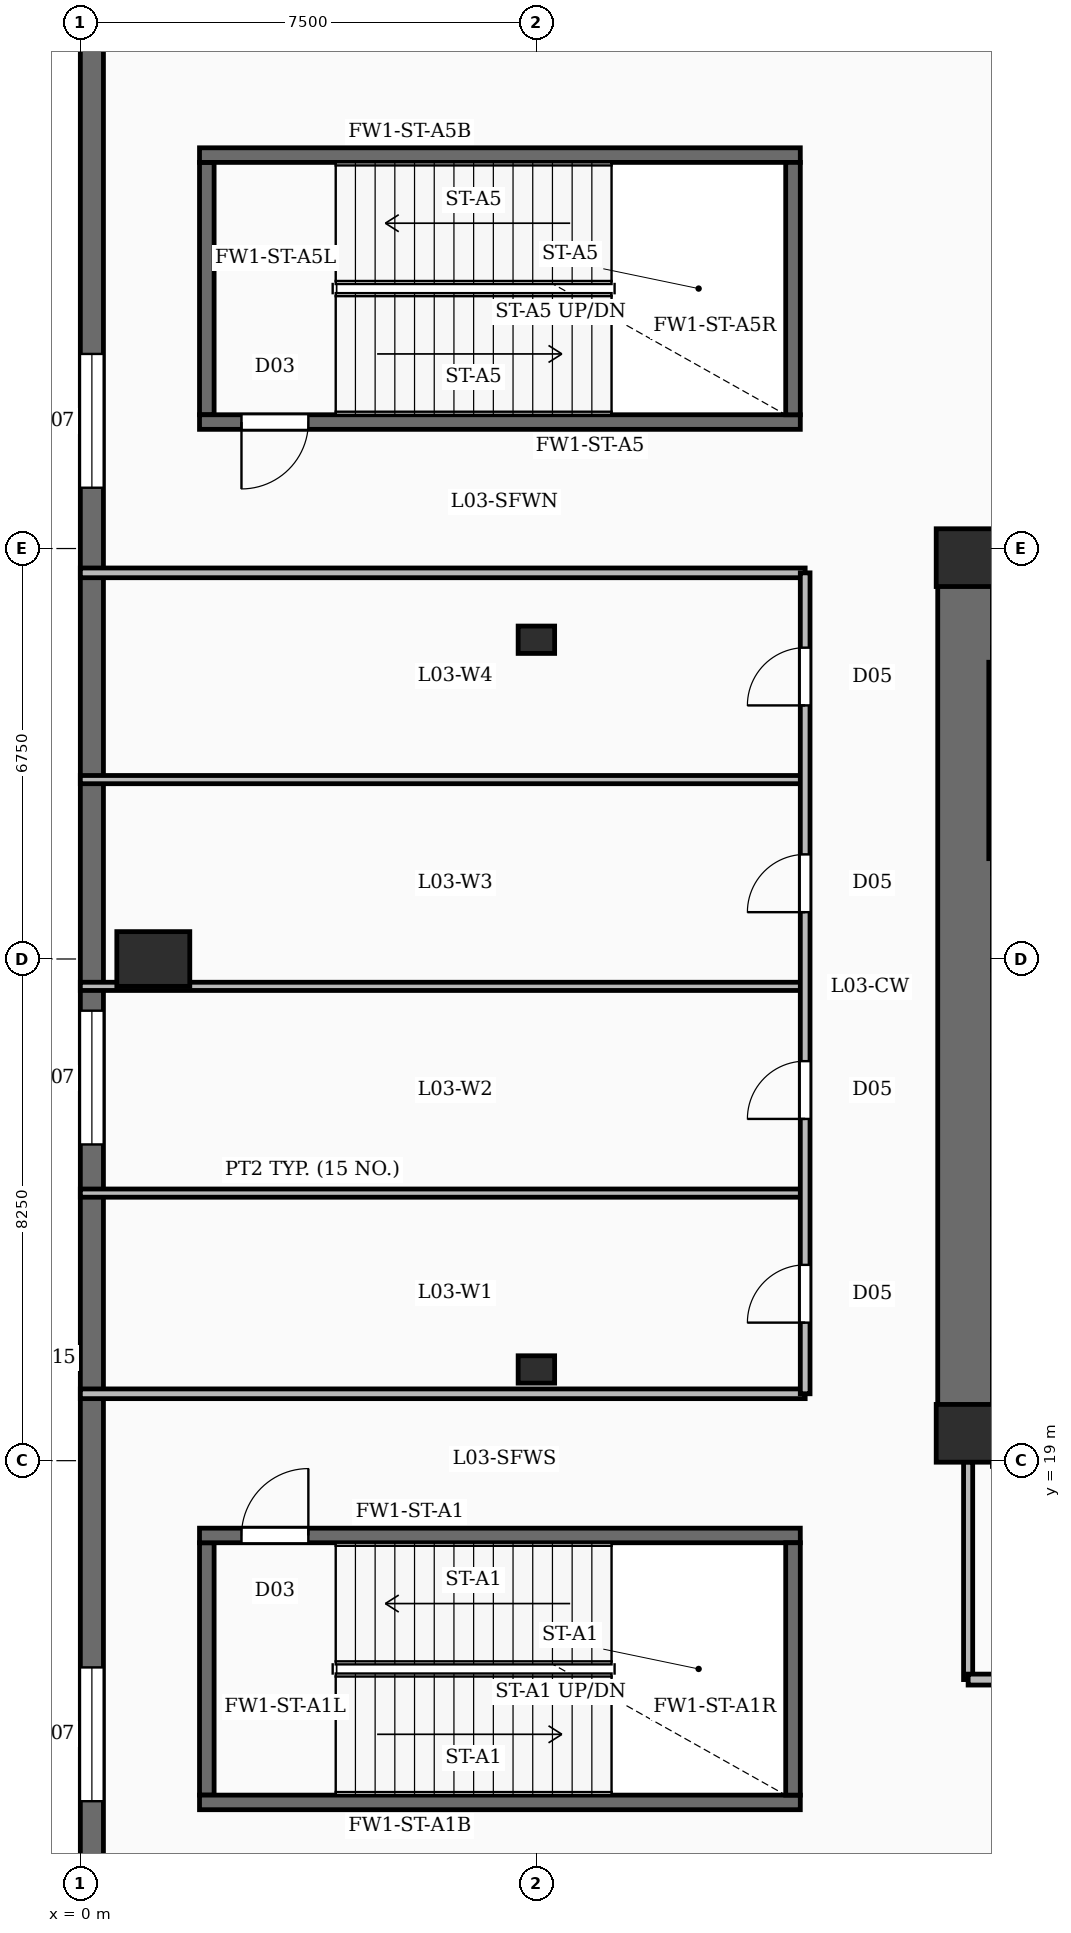
"""IFC4 building model, lengths in metres.
Left out: names, types, materials, properties, quantities, classifications, styles, units other than length and angle.
Written with IfcOpenShell. Run it as: python <this file> out.ifc"""

import sys

from ifc_helpers import new_model, si_unit, direction, frame, frame_2d, origin, origin_2d, place, context, subcontext, project, spatial, rectangle, extrude, element, fill, save


model = new_model("IFC4")
c1 = context("Model", 3, precision=1e-05, world=origin(), true_north=direction((0.0, 1.0)))
c2 = subcontext(c1, "Body", "Model", "MODEL_VIEW")
j1 = project(units=[si_unit("LENGTHUNIT", "METRE"), si_unit("PLANEANGLEUNIT", "RADIAN")], contexts=[c1])
p1 = place(None, origin())
s1 = spatial("IfcSite", under=j1, at=p1, CompositionType="ELEMENT")
p2 = place(p1, origin())
s2 = spatial("IfcBuilding", under=s1, at=p2, CompositionType="ELEMENT")
p3 = place(p2, frame((0.0, 0.0, 18.0)))
s3 = spatial("IfcBuildingStorey", under=s2, at=p3, CompositionType="ELEMENT", Elevation=18.0)
p4 = place(p3, frame((14.55, 19.0, -0.35), z_axis=(0.0, 0.0, 1.0), x_axis=(0.0, 1.0, 0.0)))
e1 = element("IfcWall", 1, at=p4, inside=s3, PredefinedType="SHEAR", context=c2, shape_type="SweptSolid", body=[
    extrude(rectangle(XDim=15.3, YDim=0.9, at=frame_2d((7.65, 0.0))), origin(), (0.0, 0.0, 1.0), 5.0),
])
for number, where, z_axis, x_axis in (
    (2, (14.55, 19.45, -0.35), (0.0, 0.0, 1.0), (1.0, 0.0, 0.0)),
    (3, (14.55, 33.85, -0.35), (0.0, 0.0, 1.0), (1.0, 0.0, 0.0)),
):
    element("IfcColumn", number, at=place(p3, frame(where, z_axis=z_axis, x_axis=x_axis)), inside=s3, PredefinedType="COLUMN", context=c2, shape_type="SweptSolid", body=[
        extrude(rectangle(XDim=0.95, YDim=0.95, at=origin_2d()), origin(), (0.0, 0.0, 1.0), 5.0),
    ])
p5 = place(p3, frame((1.2, 27.25, -0.35), z_axis=(0.0, 0.0, 1.0), x_axis=(1.0, 0.0, 0.0)))
e4 = element("IfcColumn", 4, at=p5, inside=s3, PredefinedType="COLUMN", context=c2, shape_type="SweptSolid", body=[
    extrude(rectangle(XDim=1.2, YDim=0.9, at=origin_2d()), origin(), (0.0, 0.0, 1.0), 5.0),
])
for number, where, z_axis, x_axis in (
    (5, (7.5, 20.5, -0.35), (0.0, 0.0, 1.0), (1.0, 0.0, 0.0)),
    (6, (7.5, 32.5, -0.35), (0.0, 0.0, 1.0), (1.0, 0.0, 0.0)),
):
    element("IfcColumn", number, at=place(p3, frame(where, z_axis=z_axis, x_axis=x_axis)), inside=s3, PredefinedType="PILASTER", context=c2, shape_type="SweptSolid", body=[
        extrude(rectangle(XDim=0.6, YDim=0.45, at=origin_2d()), origin(), (0.0, 0.0, 1.0), 5.0),
    ])
p6 = place(p3, frame((0.19, 5.4, 0.0), z_axis=(0.0, 0.0, 1.0), x_axis=(0.0, 1.0, 0.0)))
e7 = element("IfcWall", 7, at=p6, inside=s3, PredefinedType="SOLIDWALL", context=c2, shape_type="SweptSolid", body=[
    extrude(rectangle(XDim=43.7, YDim=0.38, at=frame_2d((21.85, 0.0))), origin(), (0.0, 0.0, 1.0), 4.65),
])
p7 = place(p6, frame((2.6, 0.0, 0.95)))
e8 = element("IfcOpeningElement", 8, at=p7, cuts=e7, PredefinedType="OPENING", context=c2, shape_type="SweptSolid", body=[
    extrude(rectangle(XDim=2.2, YDim=2.5, at=frame_2d((1.1, 1.25))), frame((0.0, 0.2, 0.0), z_axis=(0.0, -1.0, 0.0), x_axis=(1.0, 0.0, 0.0)), (0.0, 0.0, 1.0), 0.4),
])
p8 = place(p6, frame((8.0, 0.0, 0.95)))
e9 = element("IfcOpeningElement", 9, at=p8, cuts=e7, PredefinedType="OPENING", context=c2, shape_type="SweptSolid", body=[
    extrude(rectangle(XDim=2.2, YDim=2.5, at=frame_2d((1.1, 1.25))), frame((0.0, 0.2, 0.0), z_axis=(0.0, -1.0, 0.0), x_axis=(1.0, 0.0, 0.0)), (0.0, 0.0, 1.0), 0.4),
])
p9 = place(p6, frame((18.8, 0.0, 0.95)))
e10 = element("IfcOpeningElement", 10, at=p9, cuts=e7, PredefinedType="OPENING", context=c2, shape_type="SweptSolid", body=[
    extrude(rectangle(XDim=2.2, YDim=2.5, at=frame_2d((1.1, 1.25))), frame((0.0, 0.2, 0.0), z_axis=(0.0, -1.0, 0.0), x_axis=(1.0, 0.0, 0.0)), (0.0, 0.0, 1.0), 0.4),
])
p10 = place(p6, frame((29.6, 0.0, 0.95)))
e11 = element("IfcOpeningElement", 11, at=p10, cuts=e7, PredefinedType="OPENING", context=c2, shape_type="SweptSolid", body=[
    extrude(rectangle(XDim=2.2, YDim=2.5, at=frame_2d((1.1, 1.25))), frame((0.0, 0.2, 0.0), z_axis=(0.0, -1.0, 0.0), x_axis=(1.0, 0.0, 0.0)), (0.0, 0.0, 1.0), 0.4),
])
p11 = place(p3, frame((1.96, 17.77, 0.0), z_axis=(0.0, 0.0, 1.0), x_axis=(1.0, 0.0, 0.0)))
e12 = element("IfcWall", 12, at=p11, inside=s3, PredefinedType="SOLIDWALL", context=c2, shape_type="SweptSolid", body=[
    extrude(rectangle(XDim=9.88, YDim=0.24, at=frame_2d((4.94, 0.0))), origin(), (0.0, 0.0, 1.0), 4.65),
])
p12 = place(p11, frame((0.69, 0.0, 0.0)))
e13 = element("IfcOpeningElement", 13, at=p12, cuts=e12, PredefinedType="OPENING", context=c2, shape_type="SweptSolid", body=[
    extrude(rectangle(XDim=1.1, YDim=2.15, at=frame_2d((0.55, 1.075))), frame((0.0, 0.13, 0.0), z_axis=(0.0, -1.0, 0.0), x_axis=(1.0, 0.0, 0.0)), (0.0, 0.0, 1.0), 0.26),
])
p13 = place(p3, frame((1.96, 13.38, 0.0), z_axis=(0.0, 0.0, 1.0), x_axis=(1.0, 0.0, 0.0)))
e14 = element("IfcWall", 14, at=p13, inside=s3, PredefinedType="SOLIDWALL", context=c2, shape_type="SweptSolid", body=[
    extrude(rectangle(XDim=9.88, YDim=0.24, at=frame_2d((4.94, 0.0))), origin(), (0.0, 0.0, 1.0), 4.65),
])
for number, where, z_axis, x_axis in (
    (15, (2.08, 13.5, 0.0), (0.0, 0.0, 1.0), (0.0, 1.0, 0.0)),
    (16, (11.72, 13.5, 0.0), (0.0, 0.0, 1.0), (0.0, 1.0, 0.0)),
):
    element("IfcWall", number, at=place(p3, frame(where, z_axis=z_axis, x_axis=x_axis)), inside=s3, PredefinedType="SOLIDWALL", context=c2, shape_type="SweptSolid", body=[
        extrude(rectangle(XDim=4.15, YDim=0.24, at=frame_2d((2.075, 0.0))), origin(), (0.0, 0.0, 1.0), 4.65),
    ])
p14 = place(p3, frame((11.84, 36.08, 0.0), z_axis=(0.0, 0.0, 1.0), x_axis=(-1.0, 0.0, 0.0)))
e17 = element("IfcWall", 17, at=p14, inside=s3, PredefinedType="SOLIDWALL", context=c2, shape_type="SweptSolid", body=[
    extrude(rectangle(XDim=9.88, YDim=0.24, at=frame_2d((4.94, 0.0))), origin(), (0.0, 0.0, 1.0), 4.65),
])
p15 = place(p14, frame((8.09, 0.0, 0.0)))
e18 = element("IfcOpeningElement", 18, at=p15, cuts=e17, PredefinedType="OPENING", context=c2, shape_type="SweptSolid", body=[
    extrude(rectangle(XDim=1.1, YDim=2.15, at=frame_2d((0.55, 1.075))), frame((0.0, 0.13, 0.0), z_axis=(0.0, -1.0, 0.0), x_axis=(1.0, 0.0, 0.0)), (0.0, 0.0, 1.0), 0.26),
])
p16 = place(p3, frame((1.96, 40.47, 0.0), z_axis=(0.0, 0.0, 1.0), x_axis=(1.0, 0.0, 0.0)))
e19 = element("IfcWall", 19, at=p16, inside=s3, PredefinedType="SOLIDWALL", context=c2, shape_type="SweptSolid", body=[
    extrude(rectangle(XDim=9.88, YDim=0.24, at=frame_2d((4.94, 0.0))), origin(), (0.0, 0.0, 1.0), 4.65),
])
for number, where, z_axis, x_axis in (
    (20, (2.08, 36.2, 0.0), (0.0, 0.0, 1.0), (0.0, 1.0, 0.0)),
    (21, (11.72, 36.2, 0.0), (0.0, 0.0, 1.0), (0.0, 1.0, 0.0)),
):
    element("IfcWall", number, at=place(p3, frame(where, z_axis=z_axis, x_axis=x_axis)), inside=s3, PredefinedType="SOLIDWALL", context=c2, shape_type="SweptSolid", body=[
        extrude(rectangle(XDim=4.15, YDim=0.24, at=frame_2d((2.075, 0.0))), origin(), (0.0, 0.0, 1.0), 4.65),
    ])
p17 = place(p3, frame((15.06, 28.9, 0.0), z_axis=(0.0, 0.0, 1.0), x_axis=(0.0, 1.0, 0.0)))
e22 = element("IfcWall", 22, at=p17, inside=s3, PredefinedType="SOLIDWALL", context=c2, shape_type="SweptSolid", body=[
    extrude(rectangle(XDim=3.23, YDim=0.24, at=frame_2d((1.615, 0.0))), origin(), (0.0, 0.0, 1.0), 4.65),
])
p18 = place(p3, frame((14.6, 15.4, 0.0), z_axis=(0.0, 0.0, 1.0), x_axis=(1.0, 0.0, 0.0)))
e23 = element("IfcWall", 23, at=p18, inside=s3, PredefinedType="PARTITIONING", context=c2, shape_type="SweptSolid", body=[
    extrude(rectangle(XDim=9.9, YDim=0.18, at=frame_2d((4.95, 0.0))), origin(), (0.0, 0.0, 1.0), 3.71),
])
p19 = place(p18, frame((0.79, 0.0, 0.0)))
e24 = element("IfcOpeningElement", 24, at=p19, cuts=e23, PredefinedType="OPENING", context=c2, shape_type="SweptSolid", body=[
    extrude(rectangle(XDim=0.92, YDim=2.1, at=frame_2d((0.46, 1.05))), frame((0.0, 0.1, 0.0), z_axis=(0.0, -1.0, 0.0), x_axis=(1.0, 0.0, 0.0)), (0.0, 0.0, 1.0), 0.2),
])
p20 = place(p18, frame((3.29, 0.0, 0.0)))
e25 = element("IfcOpeningElement", 25, at=p20, cuts=e23, PredefinedType="OPENING", context=c2, shape_type="SweptSolid", body=[
    extrude(rectangle(XDim=0.92, YDim=2.1, at=frame_2d((0.46, 1.05))), frame((0.0, 0.1, 0.0), z_axis=(0.0, -1.0, 0.0), x_axis=(1.0, 0.0, 0.0)), (0.0, 0.0, 1.0), 0.2),
])
p21 = place(p18, frame((5.79, 0.0, 0.0)))
e26 = element("IfcOpeningElement", 26, at=p21, cuts=e23, PredefinedType="OPENING", context=c2, shape_type="SweptSolid", body=[
    extrude(rectangle(XDim=0.92, YDim=2.1, at=frame_2d((0.46, 1.05))), frame((0.0, 0.1, 0.0), z_axis=(0.0, -1.0, 0.0), x_axis=(1.0, 0.0, 0.0)), (0.0, 0.0, 1.0), 0.2),
])
p22 = place(p18, frame((8.24, 0.0, 0.0)))
e27 = element("IfcOpeningElement", 27, at=p22, cuts=e23, PredefinedType="OPENING", context=c2, shape_type="SweptSolid", body=[
    extrude(rectangle(XDim=0.92, YDim=2.1, at=frame_2d((0.46, 1.05))), frame((0.0, 0.1, 0.0), z_axis=(0.0, -1.0, 0.0), x_axis=(1.0, 0.0, 0.0)), (0.0, 0.0, 1.0), 0.2),
])
p23 = place(p3, frame((14.6, 15.4, 0.0), z_axis=(0.0, 0.0, 1.0), x_axis=(0.0, 1.0, 0.0)))
e28 = element("IfcWall", 28, at=p23, inside=s3, PredefinedType="PARTITIONING", context=c2, shape_type="SweptSolid", body=[
    extrude(rectangle(XDim=3.58, YDim=0.15, at=frame_2d((1.79, 0.0))), origin(), (0.0, 0.0, 1.0), 3.71),
])
for number, where, z_axis, x_axis in (
    (29, (0.0, 23.4, 0.0), (0.0, 0.0, 1.0), (1.0, 0.0, 0.0)),
    (30, (0.0, 26.8, 0.0), (0.0, 0.0, 1.0), (1.0, 0.0, 0.0)),
    (31, (0.0, 30.2, 0.0), (0.0, 0.0, 1.0), (1.0, 0.0, 0.0)),
):
    element("IfcWall", number, at=place(p3, frame(where, z_axis=z_axis, x_axis=x_axis)), inside=s3, PredefinedType="PARTITIONING", context=c2, shape_type="SweptSolid", body=[
        extrude(rectangle(XDim=11.92, YDim=0.135, at=frame_2d((5.96, 0.0))), origin(), (0.0, 0.0, 1.0), 3.71),
    ])
p24 = place(p3, frame((11.92, 20.1, 0.0), z_axis=(0.0, 0.0, 1.0), x_axis=(0.0, 1.0, 0.0)))
e32 = element("IfcWall", 32, at=p24, inside=s3, PredefinedType="PARTITIONING", context=c2, shape_type="SweptSolid", body=[
    extrude(rectangle(XDim=13.5, YDim=0.16, at=frame_2d((6.75, 0.0))), origin(), (0.0, 0.0, 1.0), 3.71),
])
p25 = place(p24, frame((1.17, 0.0, 0.0)))
e33 = element("IfcOpeningElement", 33, at=p25, cuts=e32, PredefinedType="OPENING", context=c2, shape_type="SweptSolid", body=[
    extrude(rectangle(XDim=0.95, YDim=2.15, at=frame_2d((0.475, 1.075))), frame((0.0, 0.09, 0.0), z_axis=(0.0, -1.0, 0.0), x_axis=(1.0, 0.0, 0.0)), (0.0, 0.0, 1.0), 0.18),
])
p26 = place(p24, frame((4.52, 0.0, 0.0)))
e34 = element("IfcOpeningElement", 34, at=p26, cuts=e32, PredefinedType="OPENING", context=c2, shape_type="SweptSolid", body=[
    extrude(rectangle(XDim=0.95, YDim=2.15, at=frame_2d((0.475, 1.075))), frame((0.0, 0.09, 0.0), z_axis=(0.0, -1.0, 0.0), x_axis=(1.0, 0.0, 0.0)), (0.0, 0.0, 1.0), 0.18),
])
p27 = place(p24, frame((7.92, 0.0, 0.0)))
e35 = element("IfcOpeningElement", 35, at=p27, cuts=e32, PredefinedType="OPENING", context=c2, shape_type="SweptSolid", body=[
    extrude(rectangle(XDim=0.95, YDim=2.15, at=frame_2d((0.475, 1.075))), frame((0.0, 0.09, 0.0), z_axis=(0.0, -1.0, 0.0), x_axis=(1.0, 0.0, 0.0)), (0.0, 0.0, 1.0), 0.18),
])
p28 = place(p24, frame((11.32, 0.0, 0.0)))
e36 = element("IfcOpeningElement", 36, at=p28, cuts=e32, PredefinedType="OPENING", context=c2, shape_type="SweptSolid", body=[
    extrude(rectangle(XDim=0.95, YDim=2.15, at=frame_2d((0.475, 1.075))), frame((0.0, 0.09, 0.0), z_axis=(0.0, -1.0, 0.0), x_axis=(1.0, 0.0, 0.0)), (0.0, 0.0, 1.0), 0.18),
])
for number, where, z_axis, x_axis in (
    (37, (0.0, 20.1, 0.0), (0.0, 0.0, 1.0), (1.0, 0.0, 0.0)),
    (38, (0.0, 33.6, 0.0), (0.0, 0.0, 1.0), (1.0, 0.0, 0.0)),
):
    element("IfcWall", number, at=place(p3, frame(where, z_axis=z_axis, x_axis=x_axis)), inside=s3, PredefinedType="PARTITIONING", context=c2, shape_type="SweptSolid", body=[
        extrude(rectangle(XDim=11.92, YDim=0.16, at=frame_2d((5.96, 0.0))), origin(), (0.0, 0.0, 1.0), 3.71),
    ])
p29 = place(p8, origin())
e39 = element("IfcWindow", 39, at=p29, inside=s3, PartitioningType="DOUBLE_PANEL_VERTICAL", PredefinedType="WINDOW", context=c2, shape_type="SweptSolid", body=[
    extrude(rectangle(XDim=2.2, YDim=2.5, at=frame_2d((1.1, 1.25))), frame((0.0, 0.03, 0.0), z_axis=(0.0, -1.0, 0.0), x_axis=(1.0, 0.0, 0.0)), (0.0, 0.0, 1.0), 0.06),
])
fill(e9, e39)
p30 = place(p9, origin())
e40 = element("IfcWindow", 40, at=p30, inside=s3, PartitioningType="DOUBLE_PANEL_VERTICAL", PredefinedType="WINDOW", context=c2, shape_type="SweptSolid", body=[
    extrude(rectangle(XDim=2.2, YDim=2.5, at=frame_2d((1.1, 1.25))), frame((0.0, 0.03, 0.0), z_axis=(0.0, -1.0, 0.0), x_axis=(1.0, 0.0, 0.0)), (0.0, 0.0, 1.0), 0.06),
])
fill(e10, e40)
p31 = place(p10, origin())
e41 = element("IfcWindow", 41, at=p31, inside=s3, PartitioningType="DOUBLE_PANEL_VERTICAL", PredefinedType="WINDOW", context=c2, shape_type="SweptSolid", body=[
    extrude(rectangle(XDim=2.2, YDim=2.5, at=frame_2d((1.1, 1.25))), frame((0.0, 0.03, 0.0), z_axis=(0.0, -1.0, 0.0), x_axis=(1.0, 0.0, 0.0)), (0.0, 0.0, 1.0), 0.06),
])
fill(e11, e41)
p32 = place(p12, origin())
e42 = element("IfcDoor", 42, at=p32, inside=s3, OperationType="SINGLE_SWING_RIGHT", PredefinedType="DOOR", context=c2, shape_type="SweptSolid", body=[
    extrude(rectangle(XDim=1.1, YDim=2.15, at=frame_2d((0.55, 1.075))), frame((0.0, 0.025, 0.0), z_axis=(0.0, -1.0, 0.0), x_axis=(1.0, 0.0, 0.0)), (0.0, 0.0, 1.0), 0.05),
])
fill(e13, e42)
p33 = place(p15, origin())
e43 = element("IfcDoor", 43, at=p33, inside=s3, OperationType="SINGLE_SWING_RIGHT", PredefinedType="DOOR", context=c2, shape_type="SweptSolid", body=[
    extrude(rectangle(XDim=1.1, YDim=2.15, at=frame_2d((0.55, 1.075))), frame((0.0, 0.025, 0.0), z_axis=(0.0, -1.0, 0.0), x_axis=(1.0, 0.0, 0.0)), (0.0, 0.0, 1.0), 0.05),
])
fill(e18, e43)
p34 = place(p25, origin())
e44 = element("IfcDoor", 44, at=p34, inside=s3, OperationType="SINGLE_SWING_LEFT", PredefinedType="DOOR", context=c2, shape_type="SweptSolid", body=[
    extrude(rectangle(XDim=0.95, YDim=2.15, at=frame_2d((0.475, 1.075))), frame((0.0, 0.025, 0.0), z_axis=(0.0, -1.0, 0.0), x_axis=(1.0, 0.0, 0.0)), (0.0, 0.0, 1.0), 0.05),
])
fill(e33, e44)
p35 = place(p26, origin())
e45 = element("IfcDoor", 45, at=p35, inside=s3, OperationType="SINGLE_SWING_LEFT", PredefinedType="DOOR", context=c2, shape_type="SweptSolid", body=[
    extrude(rectangle(XDim=0.95, YDim=2.15, at=frame_2d((0.475, 1.075))), frame((0.0, 0.025, 0.0), z_axis=(0.0, -1.0, 0.0), x_axis=(1.0, 0.0, 0.0)), (0.0, 0.0, 1.0), 0.05),
])
fill(e34, e45)
p36 = place(p27, origin())
e46 = element("IfcDoor", 46, at=p36, inside=s3, OperationType="SINGLE_SWING_LEFT", PredefinedType="DOOR", context=c2, shape_type="SweptSolid", body=[
    extrude(rectangle(XDim=0.95, YDim=2.15, at=frame_2d((0.475, 1.075))), frame((0.0, 0.025, 0.0), z_axis=(0.0, -1.0, 0.0), x_axis=(1.0, 0.0, 0.0)), (0.0, 0.0, 1.0), 0.05),
])
fill(e35, e46)
p37 = place(p28, origin())
e47 = element("IfcDoor", 47, at=p37, inside=s3, OperationType="SINGLE_SWING_LEFT", PredefinedType="DOOR", context=c2, shape_type="SweptSolid", body=[
    extrude(rectangle(XDim=0.95, YDim=2.15, at=frame_2d((0.475, 1.075))), frame((0.0, 0.025, 0.0), z_axis=(0.0, -1.0, 0.0), x_axis=(1.0, 0.0, 0.0)), (0.0, 0.0, 1.0), 0.05),
])
fill(e36, e47)
save(model, sys.argv[1])
